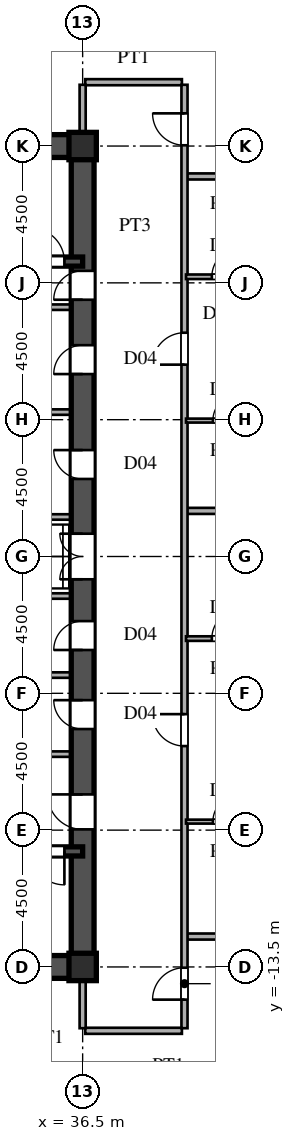
"""IFC4 building model, lengths in metres.
Left out: names, types, materials, properties, quantities, classifications, styles, units other than length and angle.
Written with IfcOpenShell. Run it as: python <this file> out.ifc"""

import sys

from ifc_helpers import new_model, si_unit, direction, frame, frame_2d, origin, origin_2d, place, context, subcontext, project, spatial, rectangle, i_section, extrude, source, transform, mapped, element, fill, save


model = new_model("IFC4")
c1 = context("Model", 3, precision=1e-05, world=origin(), true_north=direction((0.0, 1.0)))
c2 = subcontext(c1, "Body", "Model", "MODEL_VIEW")
j1 = project(units=[si_unit("LENGTHUNIT", "METRE"), si_unit("PLANEANGLEUNIT", "RADIAN")], contexts=[c1])
p1 = place(None, origin())
s1 = spatial("IfcSite", under=j1, at=p1, CompositionType="ELEMENT")
p2 = place(p1, origin())
s2 = spatial("IfcBuilding", under=s1, at=p2, CompositionType="ELEMENT")
p3 = place(p2, frame((0.0, 0.0, 51.3)))
s3 = spatial("IfcBuildingStorey", under=s2, at=p3, CompositionType="ELEMENT", Elevation=51.3)
m1 = source(origin(), c2, "Body", "SweptSolid", [
    extrude(i_section(OverallWidth=0.9, OverallDepth=0.9, WebThickness=0.036, FlangeThickness=0.055, at=origin_2d()), origin(), (0.0, 0.0, 1.0), 3.6),
])
for number, where, z_axis, x_axis in (
    (1, (36.5, -13.5, 0.0), (0.0, 0.0, 1.0), (1.0, 0.0, 0.0)),
    (2, (36.5, 13.5, 0.0), (0.0, 0.0, 1.0), (1.0, 0.0, 0.0)),
):
    element("IfcColumn", number, at=place(p3, frame(where, z_axis=z_axis, x_axis=x_axis)), inside=s3, PredefinedType="COLUMN", context=c2, shape_type="MappedRepresentation", body=[
        mapped(m1, transform((0.0, 0.0, 0.0), scale=1.0)),
    ])
for number, where, z_axis, x_axis in (
    (3, (27.5, -13.5, 0.0), (0.0, 0.0, 1.0), (1.0, 0.0, 0.0)),
    (4, (27.5, 13.5, 0.0), (0.0, 0.0, 1.0), (1.0, 0.0, 0.0)),
):
    element("IfcWall", number, at=place(p3, frame(where, z_axis=z_axis, x_axis=x_axis)), inside=s3, PredefinedType="SHEAR", context=c2, shape_type="SweptSolid", body=[
        extrude(rectangle(XDim=9.0, YDim=0.75, at=frame_2d((4.5, 0.0))), origin(), (0.0, 0.0, 1.0), 3.38),
    ])
p4 = place(p3, frame((36.5, -13.65, 0.0), z_axis=(0.0, 0.0, 1.0), x_axis=(0.0, 1.0, 0.0)))
e5 = element("IfcWall", 5, at=p4, inside=s3, PredefinedType="SHEAR", context=c2, shape_type="SweptSolid", body=[
    extrude(rectangle(XDim=7.15, YDim=0.75, at=frame_2d((3.575, 0.0))), origin(), (0.0, 0.0, 1.0), 3.38),
])
p5 = place(p4, frame((4.675, 0.0, 0.0)))
e6 = element("IfcOpeningElement", 6, at=p5, cuts=e5, PredefinedType="OPENING", context=c2, shape_type="SweptSolid", body=[
    extrude(rectangle(XDim=1.15, YDim=2.2, at=frame_2d((0.575, 1.1))), frame((0.0, 0.385, 0.0), z_axis=(0.0, -1.0, 0.0), x_axis=(1.0, 0.0, 0.0)), (0.0, 0.0, 1.0), 0.77),
])
p6 = place(p3, frame((36.5, -1.3, 0.0), z_axis=(0.0, 0.0, 1.0), x_axis=(0.0, 1.0, 0.0)))
e7 = element("IfcWall", 7, at=p6, inside=s3, PredefinedType="SHEAR", context=c2, shape_type="SweptSolid", body=[
    extrude(rectangle(XDim=2.6, YDim=0.75, at=frame_2d((1.3, 0.0))), origin(), (0.0, 0.0, 1.0), 3.38),
])
p7 = place(p6, frame((0.55, 0.0, 0.0)))
e8 = element("IfcOpeningElement", 8, at=p7, cuts=e7, PredefinedType="OPENING", context=c2, shape_type="SweptSolid", body=[
    extrude(rectangle(XDim=1.5, YDim=2.3, at=frame_2d((0.75, 1.15))), frame((0.0, 0.385, 0.0), z_axis=(0.0, -1.0, 0.0), x_axis=(1.0, 0.0, 0.0)), (0.0, 0.0, 1.0), 0.77),
])
p8 = place(p3, frame((36.5, 8.2, 0.0), z_axis=(0.0, 0.0, 1.0), x_axis=(0.0, 1.0, 0.0)))
e9 = element("IfcWall", 9, at=p8, inside=s3, PredefinedType="SHEAR", context=c2, shape_type="SweptSolid", body=[
    extrude(rectangle(XDim=5.45, YDim=0.75, at=frame_2d((2.725, 0.0))), origin(), (0.0, 0.0, 1.0), 3.38),
])
p9 = place(p8, frame((0.245, 0.0, 0.0)))
e10 = element("IfcOpeningElement", 10, at=p9, cuts=e9, PredefinedType="OPENING", context=c2, shape_type="SweptSolid", body=[
    extrude(rectangle(XDim=0.95, YDim=2.15, at=frame_2d((0.475, 1.075))), frame((0.0, 0.385, 0.0), z_axis=(0.0, -1.0, 0.0), x_axis=(1.0, 0.0, 0.0)), (0.0, 0.0, 1.0), 0.77),
])
p10 = place(p3, frame((36.5, -6.5, 0.0), z_axis=(0.0, 0.0, 1.0), x_axis=(0.0, 1.0, 0.0)))
e11 = element("IfcWall", 11, at=p10, inside=s3, PredefinedType="SHEAR", context=c2, shape_type="SweptSolid", body=[
    extrude(rectangle(XDim=2.6, YDim=0.75, at=frame_2d((1.3, 0.0))), origin(), (0.0, 0.0, 1.0), 3.38),
])
p11 = place(p10, frame((0.825, 0.0, 0.0)))
e12 = element("IfcOpeningElement", 12, at=p11, cuts=e11, PredefinedType="OPENING", context=c2, shape_type="SweptSolid", body=[
    extrude(rectangle(XDim=0.95, YDim=2.15, at=frame_2d((0.475, 1.075))), frame((0.0, 0.385, 0.0), z_axis=(0.0, -1.0, 0.0), x_axis=(1.0, 0.0, 0.0)), (0.0, 0.0, 1.0), 0.77),
])
p12 = place(p3, frame((36.5, -3.9, 0.0), z_axis=(0.0, 0.0, 1.0), x_axis=(0.0, 1.0, 0.0)))
e13 = element("IfcWall", 13, at=p12, inside=s3, PredefinedType="SHEAR", context=c2, shape_type="SweptSolid", body=[
    extrude(rectangle(XDim=2.6, YDim=0.75, at=frame_2d((1.3, 0.0))), origin(), (0.0, 0.0, 1.0), 3.38),
])
p13 = place(p12, frame((0.825, 0.0, 0.0)))
e14 = element("IfcOpeningElement", 14, at=p13, cuts=e13, PredefinedType="OPENING", context=c2, shape_type="SweptSolid", body=[
    extrude(rectangle(XDim=0.95, YDim=2.15, at=frame_2d((0.475, 1.075))), frame((0.0, 0.385, 0.0), z_axis=(0.0, -1.0, 0.0), x_axis=(1.0, 0.0, 0.0)), (0.0, 0.0, 1.0), 0.77),
])
p14 = place(p3, frame((36.5, 1.3, 0.0), z_axis=(0.0, 0.0, 1.0), x_axis=(0.0, 1.0, 0.0)))
e15 = element("IfcWall", 15, at=p14, inside=s3, PredefinedType="SHEAR", context=c2, shape_type="SweptSolid", body=[
    extrude(rectangle(XDim=3.45, YDim=0.75, at=frame_2d((1.725, 0.0))), origin(), (0.0, 0.0, 1.0), 3.38),
])
p15 = place(p14, frame((1.25, 0.0, 0.0)))
e16 = element("IfcOpeningElement", 16, at=p15, cuts=e15, PredefinedType="OPENING", context=c2, shape_type="SweptSolid", body=[
    extrude(rectangle(XDim=0.95, YDim=2.15, at=frame_2d((0.475, 1.075))), frame((0.0, 0.385, 0.0), z_axis=(0.0, -1.0, 0.0), x_axis=(1.0, 0.0, 0.0)), (0.0, 0.0, 1.0), 0.77),
])
p16 = place(p3, frame((36.5, 4.75, 0.0), z_axis=(0.0, 0.0, 1.0), x_axis=(0.0, 1.0, 0.0)))
e17 = element("IfcWall", 17, at=p16, inside=s3, PredefinedType="SHEAR", context=c2, shape_type="SweptSolid", body=[
    extrude(rectangle(XDim=3.45, YDim=0.75, at=frame_2d((1.725, 0.0))), origin(), (0.0, 0.0, 1.0), 3.38),
])
p17 = place(p16, frame((1.25, 0.0, 0.0)))
e18 = element("IfcOpeningElement", 18, at=p17, cuts=e17, PredefinedType="OPENING", context=c2, shape_type="SweptSolid", body=[
    extrude(rectangle(XDim=0.95, YDim=2.15, at=frame_2d((0.475, 1.075))), frame((0.0, 0.385, 0.0), z_axis=(0.0, -1.0, 0.0), x_axis=(1.0, 0.0, 0.0)), (0.0, 0.0, 1.0), 0.77),
])
p18 = place(p3, frame((27.5, -9.7, 0.0), z_axis=(0.0, 0.0, 1.0), x_axis=(1.0, 0.0, 0.0)))
e19 = element("IfcWall", 19, at=p18, inside=s3, PredefinedType="SHEAR", context=c2, shape_type="SweptSolid", body=[
    extrude(rectangle(XDim=9.0, YDim=0.3, at=frame_2d((4.5, 0.0))), origin(), (0.0, 0.0, 1.0), 3.38),
])
p19 = place(p18, frame((7.3, 0.0, 0.0)))
e20 = element("IfcOpeningElement", 20, at=p19, cuts=e19, PredefinedType="OPENING", context=c2, shape_type="SweptSolid", body=[
    extrude(rectangle(XDim=1.1, YDim=2.2, at=frame_2d((0.55, 1.1))), frame((0.0, 0.16, 0.0), z_axis=(0.0, -1.0, 0.0), x_axis=(1.0, 0.0, 0.0)), (0.0, 0.0, 1.0), 0.32),
])
p20 = place(p3, frame((27.5, 9.7, 0.0), z_axis=(0.0, 0.0, 1.0), x_axis=(1.0, 0.0, 0.0)))
e21 = element("IfcWall", 21, at=p20, inside=s3, PredefinedType="SHEAR", context=c2, shape_type="SweptSolid", body=[
    extrude(rectangle(XDim=9.0, YDim=0.3, at=frame_2d((4.5, 0.0))), origin(), (0.0, 0.0, 1.0), 3.38),
])
p21 = place(p20, frame((7.3, 0.0, 0.0)))
e22 = element("IfcOpeningElement", 22, at=p21, cuts=e21, PredefinedType="OPENING", context=c2, shape_type="SweptSolid", body=[
    extrude(rectangle(XDim=1.1, YDim=2.2, at=frame_2d((0.55, 1.1))), frame((0.0, 0.16, 0.0), z_axis=(0.0, -1.0, 0.0), x_axis=(1.0, 0.0, 0.0)), (0.0, 0.0, 1.0), 0.32),
])
for number, where, z_axis, x_axis in (
    (23, (30.45, -6.5, 0.0), (0.0, 0.0, 1.0), (1.0, 0.0, 0.0)),
    (24, (30.45, 8.2, 0.0), (0.0, 0.0, 1.0), (1.0, 0.0, 0.0)),
):
    element("IfcWall", number, at=place(p3, frame(where, z_axis=z_axis, x_axis=x_axis)), inside=s3, PredefinedType="PARTITIONING", context=c2, shape_type="SweptSolid", body=[
        extrude(rectangle(XDim=5.7, YDim=0.18, at=frame_2d((2.85, 0.0))), origin(), (0.0, 0.0, 1.0), 3.38),
    ])
for number, where, z_axis, x_axis in (
    (25, (33.2, -1.3, 0.0), (0.0, 0.0, 1.0), (1.0, 0.0, 0.0)),
    (26, (33.2, 1.3, 0.0), (0.0, 0.0, 1.0), (1.0, 0.0, 0.0)),
    (27, (33.2, -3.9, 0.0), (0.0, 0.0, 1.0), (1.0, 0.0, 0.0)),
    (28, (33.2, 4.75, 0.0), (0.0, 0.0, 1.0), (1.0, 0.0, 0.0)),
):
    element("IfcWall", number, at=place(p3, frame(where, z_axis=z_axis, x_axis=x_axis)), inside=s3, PredefinedType="PARTITIONING", context=c2, shape_type="SweptSolid", body=[
        extrude(rectangle(XDim=2.95, YDim=0.18, at=frame_2d((1.475, 0.0))), origin(), (0.0, 0.0, 1.0), 3.38),
    ])
p22 = place(p3, frame((36.585, -15.6, 0.0), z_axis=(0.0, 0.0, 1.0), x_axis=(1.0, 0.0, 0.0)))
e29 = element("IfcWall", 29, at=p22, inside=s3, PredefinedType="PARTITIONING", context=c2, shape_type="SweptSolid", body=[
    extrude(rectangle(XDim=3.18, YDim=0.2, at=frame_2d((1.59, 0.0))), origin(), (0.0, 0.0, 1.0), 3.38),
])
p23 = place(p3, frame((39.93, -12.5, 0.0), z_axis=(0.0, 0.0, 1.0), x_axis=(1.0, 0.0, 0.0)))
e30 = element("IfcWall", 30, at=p23, inside=s3, PredefinedType="PARTITIONING", context=c2, shape_type="SweptSolid", body=[
    extrude(rectangle(XDim=26.407, YDim=0.2, at=frame_2d((13.204, 0.0))), origin(), (0.0, 0.0, 1.0), 3.38),
])
p24 = place(p3, frame((39.9, -8.72, 0.0), z_axis=(0.0, 0.0, 1.0), x_axis=(1.0, 0.0, 0.0)))
e31 = element("IfcWall", 31, at=p24, inside=s3, PredefinedType="PARTITIONING", context=c2, shape_type="SweptSolid", body=[
    extrude(rectangle(XDim=2.65, YDim=0.13, at=frame_2d((1.325, 0.0))), origin(), (0.0, 0.0, 1.0), 3.38),
])
p25 = place(p24, frame((0.885, 0.0, 0.0)))
e32 = element("IfcOpeningElement", 32, at=p25, cuts=e31, PredefinedType="OPENING", context=c2, shape_type="SweptSolid", body=[
    extrude(rectangle(XDim=0.88, YDim=2.1, at=frame_2d((0.44, 1.05))), frame((0.0, 0.075, 0.0), z_axis=(0.0, -1.0, 0.0), x_axis=(1.0, 0.0, 0.0)), (0.0, 0.0, 1.0), 0.15),
])
p26 = place(p3, frame((39.9, -2.7, 0.0), z_axis=(0.0, 0.0, 1.0), x_axis=(1.0, 0.0, 0.0)))
e33 = element("IfcWall", 33, at=p26, inside=s3, PredefinedType="PARTITIONING", context=c2, shape_type="SweptSolid", body=[
    extrude(rectangle(XDim=2.65, YDim=0.15, at=frame_2d((1.325, 0.0))), origin(), (0.0, 0.0, 1.0), 3.38),
])
p27 = place(p26, frame((0.85, 0.0, 0.0)))
e34 = element("IfcOpeningElement", 34, at=p27, cuts=e33, PredefinedType="OPENING", context=c2, shape_type="SweptSolid", body=[
    extrude(rectangle(XDim=0.95, YDim=2.15, at=frame_2d((0.475, 1.075))), frame((0.0, 0.085, 0.0), z_axis=(0.0, -1.0, 0.0), x_axis=(1.0, 0.0, 0.0)), (0.0, 0.0, 1.0), 0.17),
])
p28 = place(p3, frame((39.93, 1.5, 0.0), z_axis=(0.0, 0.0, 1.0), x_axis=(1.0, 0.0, 0.0)))
e35 = element("IfcWall", 35, at=p28, inside=s3, PredefinedType="PARTITIONING", context=c2, shape_type="SweptSolid", body=[
    extrude(rectangle(XDim=32.575, YDim=0.2, at=frame_2d((16.288, 0.0))), origin(), (0.0, 0.0, 1.0), 3.38),
])
p29 = place(p3, frame((39.9, 4.47, 0.0), z_axis=(0.0, 0.0, 1.0), x_axis=(1.0, 0.0, 0.0)))
e36 = element("IfcWall", 36, at=p29, inside=s3, PredefinedType="PARTITIONING", context=c2, shape_type="SweptSolid", body=[
    extrude(rectangle(XDim=2.65, YDim=0.13, at=frame_2d((1.325, 0.0))), origin(), (0.0, 0.0, 1.0), 2.68),
])
p30 = place(p29, frame((0.885, 0.0, 0.0)))
e37 = element("IfcOpeningElement", 37, at=p30, cuts=e36, PredefinedType="OPENING", context=c2, shape_type="SweptSolid", body=[
    extrude(rectangle(XDim=0.88, YDim=2.1, at=frame_2d((0.44, 1.05))), frame((0.0, 0.075, 0.0), z_axis=(0.0, -1.0, 0.0), x_axis=(1.0, 0.0, 0.0)), (0.0, 0.0, 1.0), 0.15),
])
p31 = place(p3, frame((39.9, 9.2, 0.0), z_axis=(0.0, 0.0, 1.0), x_axis=(1.0, 0.0, 0.0)))
e38 = element("IfcWall", 38, at=p31, inside=s3, PredefinedType="PARTITIONING", context=c2, shape_type="SweptSolid", body=[
    extrude(rectangle(XDim=2.65, YDim=0.15, at=frame_2d((1.325, 0.0))), origin(), (0.0, 0.0, 1.0), 3.38),
])
p32 = place(p31, frame((0.85, 0.0, 0.0)))
e39 = element("IfcOpeningElement", 39, at=p32, cuts=e38, PredefinedType="OPENING", context=c2, shape_type="SweptSolid", body=[
    extrude(rectangle(XDim=0.95, YDim=2.15, at=frame_2d((0.475, 1.075))), frame((0.0, 0.085, 0.0), z_axis=(0.0, -1.0, 0.0), x_axis=(1.0, 0.0, 0.0)), (0.0, 0.0, 1.0), 0.17),
])
p33 = place(p3, frame((39.93, 12.5, 0.0), z_axis=(0.0, 0.0, 1.0), x_axis=(1.0, 0.0, 0.0)))
e40 = element("IfcWall", 40, at=p33, inside=s3, PredefinedType="PARTITIONING", context=c2, shape_type="SweptSolid", body=[
    extrude(rectangle(XDim=26.407, YDim=0.2, at=frame_2d((13.204, 0.0))), origin(), (0.0, 0.0, 1.0), 3.38),
])
p34 = place(p3, frame((36.585, 15.6, 0.0), z_axis=(0.0, 0.0, 1.0), x_axis=(1.0, 0.0, 0.0)))
e41 = element("IfcWall", 41, at=p34, inside=s3, PredefinedType="PARTITIONING", context=c2, shape_type="SweptSolid", body=[
    extrude(rectangle(XDim=3.18, YDim=0.2, at=frame_2d((1.59, 0.0))), origin(), (0.0, 0.0, 1.0), 3.38),
])
for number, where, z_axis, x_axis in (
    (42, (36.5, -15.515, 0.0), (0.0, 0.0, 1.0), (0.0, 1.0, 0.0)),
    (43, (36.5, 13.88, 0.0), (0.0, 0.0, 1.0), (0.0, 1.0, 0.0)),
):
    element("IfcWall", number, at=place(p3, frame(where, z_axis=z_axis, x_axis=x_axis)), inside=s3, PredefinedType="PARTITIONING", context=c2, shape_type="SweptSolid", body=[
        extrude(rectangle(XDim=1.635, YDim=0.2, at=frame_2d((0.817, 0.0))), origin(), (0.0, 0.0, 1.0), 2.68),
    ])
p35 = place(p3, frame((39.85, -15.515, 0.0), z_axis=(0.0, 0.0, 1.0), x_axis=(0.0, 1.0, 0.0)))
e44 = element("IfcWall", 44, at=p35, inside=s3, PredefinedType="PARTITIONING", context=c2, shape_type="SweptSolid", body=[
    extrude(rectangle(XDim=31.03, YDim=0.2, at=frame_2d((15.515, 0.0))), origin(), (0.0, 0.0, 1.0), 3.38),
])
p36 = place(p35, frame((0.94, 0.0, 0.0)))
e45 = element("IfcOpeningElement", 45, at=p36, cuts=e44, PredefinedType="OPENING", context=c2, shape_type="SweptSolid", body=[
    extrude(rectangle(XDim=1.05, YDim=2.25, at=frame_2d((0.525, 1.125))), frame((0.0, 0.11, 0.0), z_axis=(0.0, -1.0, 0.0), x_axis=(1.0, 0.0, 0.0)), (0.0, 0.0, 1.0), 0.22),
])
p37 = place(p35, frame((9.28, 0.0, 0.0)))
e46 = element("IfcOpeningElement", 46, at=p37, cuts=e44, PredefinedType="OPENING", context=c2, shape_type="SweptSolid", body=[
    extrude(rectangle(XDim=1.05, YDim=2.25, at=frame_2d((0.525, 1.125))), frame((0.0, 0.11, 0.0), z_axis=(0.0, -1.0, 0.0), x_axis=(1.0, 0.0, 0.0)), (0.0, 0.0, 1.0), 0.22),
])
p38 = place(p35, frame((21.825, 0.0, 0.0)))
e47 = element("IfcOpeningElement", 47, at=p38, cuts=e44, PredefinedType="OPENING", context=c2, shape_type="SweptSolid", body=[
    extrude(rectangle(XDim=1.05, YDim=2.25, at=frame_2d((0.525, 1.125))), frame((0.0, 0.11, 0.0), z_axis=(0.0, -1.0, 0.0), x_axis=(1.0, 0.0, 0.0)), (0.0, 0.0, 1.0), 0.22),
])
p39 = place(p35, frame((29.04, 0.0, 0.0)))
e48 = element("IfcOpeningElement", 48, at=p39, cuts=e44, PredefinedType="OPENING", context=c2, shape_type="SweptSolid", body=[
    extrude(rectangle(XDim=1.05, YDim=2.25, at=frame_2d((0.525, 1.125))), frame((0.0, 0.11, 0.0), z_axis=(0.0, -1.0, 0.0), x_axis=(1.0, 0.0, 0.0)), (0.0, 0.0, 1.0), 0.22),
])
m2 = source(origin(), c2, "Body", "SweptSolid", [
    extrude(rectangle(XDim=1.15, YDim=2.2, at=frame_2d((0.575, 1.1))), frame((0.0, 0.025, 0.0), z_axis=(0.0, -1.0, 0.0), x_axis=(1.0, 0.0, 0.0)), (0.0, 0.0, 1.0), 0.05),
])
p40 = place(p5, origin())
e49 = element("IfcDoor", 49, at=p40, inside=s3, OperationType="SINGLE_SWING_RIGHT", PredefinedType="DOOR", context=c2, shape_type="MappedRepresentation", body=[
    mapped(m2, transform((0.0, 0.0, 0.0), scale=1.0)),
])
fill(e6, e49)
m3 = source(origin(), c2, "Body", "SweptSolid", [
    extrude(rectangle(XDim=1.5, YDim=2.3, at=frame_2d((0.75, 1.15))), frame((0.0, 0.025, 0.0), z_axis=(0.0, -1.0, 0.0), x_axis=(1.0, 0.0, 0.0)), (0.0, 0.0, 1.0), 0.05),
])
p41 = place(p7, origin())
e50 = element("IfcDoor", 50, at=p41, inside=s3, OperationType="DOUBLE_SWING_LEFT", PredefinedType="DOOR", context=c2, shape_type="MappedRepresentation", body=[
    mapped(m3, transform((0.0, 0.0, 0.0), scale=1.0)),
])
fill(e8, e50)
m4 = source(origin(), c2, "Body", "SweptSolid", [
    extrude(rectangle(XDim=0.95, YDim=2.15, at=frame_2d((0.475, 1.075))), frame((0.0, 0.025, 0.0), z_axis=(0.0, -1.0, 0.0), x_axis=(1.0, 0.0, 0.0)), (0.0, 0.0, 1.0), 0.05),
])
p42 = place(p9, origin())
e51 = element("IfcDoor", 51, at=p42, inside=s3, OperationType="SINGLE_SWING_LEFT", PredefinedType="DOOR", context=c2, shape_type="MappedRepresentation", body=[
    mapped(m4, transform((0.0, 0.0, 0.0), scale=1.0)),
])
fill(e10, e51)
p43 = place(p11, origin())
e52 = element("IfcDoor", 52, at=p43, inside=s3, OperationType="SINGLE_SWING_RIGHT", PredefinedType="DOOR", context=c2, shape_type="MappedRepresentation", body=[
    mapped(m4, transform((0.0, 0.0, 0.0), scale=1.0)),
])
fill(e12, e52)
p44 = place(p13, origin())
e53 = element("IfcDoor", 53, at=p44, inside=s3, OperationType="SINGLE_SWING_LEFT", PredefinedType="DOOR", context=c2, shape_type="MappedRepresentation", body=[
    mapped(m4, transform((0.0, 0.0, 0.0), scale=1.0)),
])
fill(e14, e53)
p45 = place(p15, origin())
e54 = element("IfcDoor", 54, at=p45, inside=s3, OperationType="SINGLE_SWING_RIGHT", PredefinedType="DOOR", context=c2, shape_type="MappedRepresentation", body=[
    mapped(m4, transform((0.0, 0.0, 0.0), scale=1.0)),
])
fill(e16, e54)
p46 = place(p17, origin())
e55 = element("IfcDoor", 55, at=p46, inside=s3, OperationType="SINGLE_SWING_LEFT", PredefinedType="DOOR", context=c2, shape_type="MappedRepresentation", body=[
    mapped(m4, transform((0.0, 0.0, 0.0), scale=1.0)),
])
fill(e18, e55)
m5 = source(origin(), c2, "Body", "SweptSolid", [
    extrude(rectangle(XDim=1.1, YDim=2.2, at=frame_2d((0.55, 1.1))), frame((0.0, 0.025, 0.0), z_axis=(0.0, -1.0, 0.0), x_axis=(1.0, 0.0, 0.0)), (0.0, 0.0, 1.0), 0.05),
])
p47 = place(p19, frame((1.1, 0.0, 0.0), z_axis=(0.0, 0.0, 1.0), x_axis=(-1.0, 0.0, 0.0)))
e56 = element("IfcDoor", 56, at=p47, inside=s3, OperationType="SINGLE_SWING_RIGHT", PredefinedType="DOOR", context=c2, shape_type="MappedRepresentation", body=[
    mapped(m5, transform((0.0, 0.0, 0.0), scale=1.0)),
])
fill(e20, e56)
p48 = place(p21, origin())
e57 = element("IfcDoor", 57, at=p48, inside=s3, OperationType="SINGLE_SWING_LEFT", PredefinedType="DOOR", context=c2, shape_type="MappedRepresentation", body=[
    mapped(m5, transform((0.0, 0.0, 0.0), scale=1.0)),
])
fill(e22, e57)
m6 = source(origin(), c2, "Body", "SweptSolid", [
    extrude(rectangle(XDim=0.88, YDim=2.1, at=frame_2d((0.44, 1.05))), frame((0.0, 0.025, 0.0), z_axis=(0.0, -1.0, 0.0), x_axis=(1.0, 0.0, 0.0)), (0.0, 0.0, 1.0), 0.05),
])
p49 = place(p25, origin())
e58 = element("IfcDoor", 58, at=p49, inside=s3, OperationType="SINGLE_SWING_RIGHT", PredefinedType="DOOR", context=c2, shape_type="MappedRepresentation", body=[
    mapped(m6, transform((0.0, 0.0, 0.0), scale=1.0)),
])
fill(e32, e58)
m7 = source(origin(), c2, "Body", "SweptSolid", [
    extrude(rectangle(XDim=0.95, YDim=2.15, at=frame_2d((0.475, 1.075))), frame((0.0, 0.025, 0.0), z_axis=(0.0, -1.0, 0.0), x_axis=(1.0, 0.0, 0.0)), (0.0, 0.0, 1.0), 0.05),
])
p50 = place(p27, origin())
e59 = element("IfcDoor", 59, at=p50, inside=s3, OperationType="SINGLE_SWING_RIGHT", PredefinedType="DOOR", context=c2, shape_type="MappedRepresentation", body=[
    mapped(m7, transform((0.0, 0.0, 0.0), scale=1.0)),
])
fill(e34, e59)
p51 = place(p30, origin())
e60 = element("IfcDoor", 60, at=p51, inside=s3, OperationType="SINGLE_SWING_RIGHT", PredefinedType="DOOR", context=c2, shape_type="MappedRepresentation", body=[
    mapped(m6, transform((0.0, 0.0, 0.0), scale=1.0)),
])
fill(e37, e60)
p52 = place(p32, origin())
e61 = element("IfcDoor", 61, at=p52, inside=s3, OperationType="SINGLE_SWING_RIGHT", PredefinedType="DOOR", context=c2, shape_type="MappedRepresentation", body=[
    mapped(m7, transform((0.0, 0.0, 0.0), scale=1.0)),
])
fill(e39, e61)
m8 = source(origin(), c2, "Body", "SweptSolid", [
    extrude(rectangle(XDim=1.05, YDim=2.25, at=frame_2d((0.525, 1.125))), frame((0.0, 0.025, 0.0), z_axis=(0.0, -1.0, 0.0), x_axis=(1.0, 0.0, 0.0)), (0.0, 0.0, 1.0), 0.05),
])
p53 = place(p36, origin())
e62 = element("IfcDoor", 62, at=p53, inside=s3, OperationType="SINGLE_SWING_LEFT", PredefinedType="DOOR", context=c2, shape_type="MappedRepresentation", body=[
    mapped(m8, transform((0.0, 0.0, 0.0), scale=1.0)),
])
fill(e45, e62)
p54 = place(p37, origin())
e63 = element("IfcDoor", 63, at=p54, inside=s3, OperationType="SINGLE_SWING_RIGHT", PredefinedType="DOOR", context=c2, shape_type="MappedRepresentation", body=[
    mapped(m8, transform((0.0, 0.0, 0.0), scale=1.0)),
])
fill(e46, e63)
p55 = place(p38, origin())
e64 = element("IfcDoor", 64, at=p55, inside=s3, OperationType="SINGLE_SWING_LEFT", PredefinedType="DOOR", context=c2, shape_type="MappedRepresentation", body=[
    mapped(m8, transform((0.0, 0.0, 0.0), scale=1.0)),
])
fill(e47, e64)
p56 = place(p39, origin())
e65 = element("IfcDoor", 65, at=p56, inside=s3, OperationType="SINGLE_SWING_RIGHT", PredefinedType="DOOR", context=c2, shape_type="MappedRepresentation", body=[
    mapped(m8, transform((0.0, 0.0, 0.0), scale=1.0)),
])
fill(e48, e65)
save(model, sys.argv[1])
